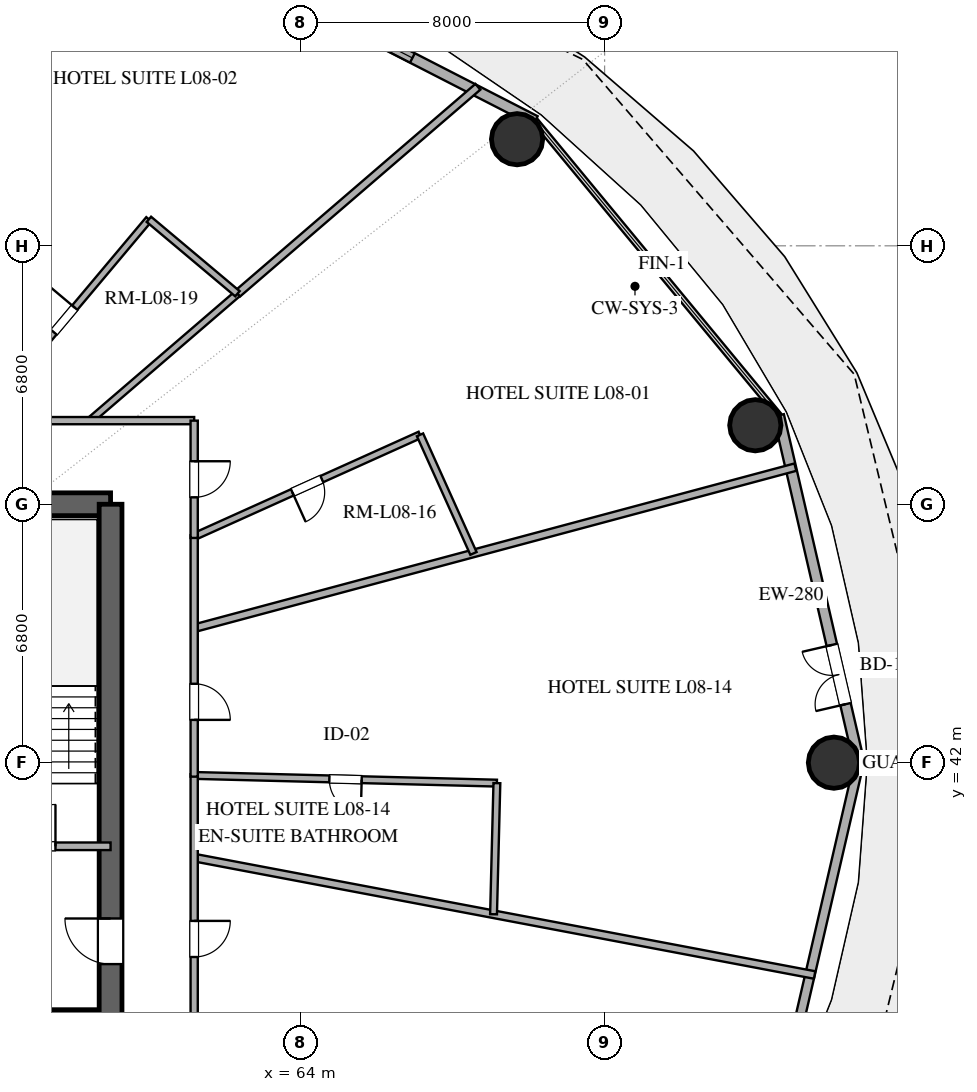
"""IFC4 building model, lengths in metres.
Left out: names, types, materials, properties, quantities, classifications, styles, units other than length and angle.
Written with IfcOpenShell. Run it as: python <this file> out.ifc"""

import sys

from ifc_helpers import new_model, si_unit, direction, frame, frame_2d, origin, origin_2d, place, context, subcontext, project, spatial, rectangle, hollow_circle, extrude, element, fill, save


model = new_model("IFC4")
c1 = context("Model", 3, precision=1e-05, world=origin(), true_north=direction((0.0, 1.0)))
c2 = subcontext(c1, "Body", "Model", "MODEL_VIEW")
j1 = project(units=[si_unit("LENGTHUNIT", "METRE"), si_unit("PLANEANGLEUNIT", "RADIAN")], contexts=[c1])
p1 = place(None, origin())
s1 = spatial("IfcSite", under=j1, at=p1, CompositionType="ELEMENT")
p2 = place(p1, origin())
s2 = spatial("IfcBuilding", under=s1, at=p2, CompositionType="ELEMENT")
p3 = place(p2, frame((0.0, 0.0, 39.0)))
s3 = spatial("IfcBuildingStorey", under=s2, at=p3, CompositionType="ELEMENT", Elevation=39.0)
for number, where, z_axis, x_axis in (
    (1, (55.0, 35.2, 0.0), (0.0, 0.0, 1.0), (1.0, 0.0, 0.0)),
    (2, (55.0, 48.8, 0.0), (0.0, 0.0, 1.0), (1.0, 0.0, 0.0)),
):
    element("IfcWall", number, at=place(p3, frame(where, z_axis=z_axis, x_axis=x_axis)), inside=s3, PredefinedType="SHEAR", context=c2, shape_type="SweptSolid", body=[
        extrude(rectangle(XDim=4.0, YDim=0.6, at=frame_2d((2.0, 0.0))), origin(), (0.0, 0.0, 1.0), 3.38),
    ])
p4 = place(p3, frame((59.0, 35.2, 0.0), z_axis=(0.0, 0.0, 1.0), x_axis=(0.0, 1.0, 0.0)))
e3 = element("IfcWall", 3, at=p4, inside=s3, PredefinedType="SHEAR", context=c2, shape_type="SweptSolid", body=[
    extrude(rectangle(XDim=13.6, YDim=0.6, at=frame_2d((6.8, 0.0))), origin(), (0.0, 0.0, 1.0), 3.38),
])
p5 = place(p4, frame((1.5, 0.0, 0.0)))
e4 = element("IfcOpeningElement", 4, at=p5, cuts=e3, PredefinedType="OPENING", context=c2, shape_type="SweptSolid", body=[
    extrude(rectangle(XDim=1.2, YDim=2.15, at=frame_2d((0.6, 1.075))), frame((0.0, 0.31, 0.0), z_axis=(0.0, -1.0, 0.0), x_axis=(1.0, 0.0, 0.0)), (0.0, 0.0, 1.0), 0.62),
])
for number, where, z_axis, x_axis in (
    (5, (78.035, 42.0, 0.0), (0.0, 0.0, 1.0), (1.0, 0.0, 0.0)),
    (6, (75.966, 50.878, 0.0), (0.0, 0.0, 1.0), (1.0, 0.0, 0.0)),
    (7, (69.697, 58.405, 0.0), (0.0, 0.0, 1.0), (1.0, 0.0, 0.0)),
):
    element("IfcColumn", number, at=place(p3, frame(where, z_axis=z_axis, x_axis=x_axis)), inside=s3, PredefinedType="COLUMN", context=c2, shape_type="SweptSolid", body=[
        extrude(hollow_circle(Radius=0.675, WallThickness=0.036, at=origin_2d()), origin(), (0.0, 0.0, 1.0), 3.38),
    ])
p6 = place(p3, frame((78.696, 42.0, 0.0), z_axis=(0.0, 0.0, 1.0), x_axis=(-0.225454452941, 0.974253709076, 0.0)))
e8 = element("IfcWall", 8, at=p6, inside=s3, PredefinedType="SOLIDWALL", context=c2, shape_type="SweptSolid", body=[
    extrude(rectangle(XDim=9.38, YDim=0.28, at=frame_2d((4.69, 0.0))), origin(), (0.0, 0.0, 1.0), 3.38),
])
p7 = place(p6, frame((1.579, 0.0, 0.0)))
e9 = element("IfcOpeningElement", 9, at=p7, cuts=e8, PredefinedType="OPENING", context=c2, shape_type="SweptSolid", body=[
    extrude(rectangle(XDim=1.6, YDim=2.25, at=frame_2d((0.8, 1.125))), frame((0.0, 0.15, 0.0), z_axis=(0.0, -1.0, 0.0), x_axis=(1.0, 0.0, 0.0)), (0.0, 0.0, 1.0), 0.3),
])
p8 = place(p3, frame((70.174, 58.886, 0.0), z_axis=(0.0, 0.0, 1.0), x_axis=(-0.889853976658, 0.456245438581, 0.0)))
e10 = element("IfcWall", 10, at=p8, inside=s3, PredefinedType="SOLIDWALL", context=c2, shape_type="SweptSolid", body=[
    extrude(rectangle(XDim=11.346, YDim=0.28, at=frame_2d((5.673, 0.0))), origin(), (0.0, 0.0, 1.0), 3.38),
])
p9 = place(p8, frame((3.632, 0.0, 0.85)))
e11 = element("IfcOpeningElement", 11, at=p9, cuts=e10, PredefinedType="OPENING", context=c2, shape_type="SweptSolid", body=[
    extrude(rectangle(XDim=1.5, YDim=2.0, at=frame_2d((0.75, 1.0))), frame((0.0, 0.15, 0.0), z_axis=(0.0, -1.0, 0.0), x_axis=(1.0, 0.0, 0.0)), (0.0, 0.0, 1.0), 0.3),
])
p10 = place(p8, frame((6.761, 0.0, 0.85)))
e12 = element("IfcOpeningElement", 12, at=p10, cuts=e10, PredefinedType="OPENING", context=c2, shape_type="SweptSolid", body=[
    extrude(rectangle(XDim=1.5, YDim=2.0, at=frame_2d((0.75, 1.0))), frame((0.0, 0.15, 0.0), z_axis=(0.0, -1.0, 0.0), x_axis=(1.0, 0.0, 0.0)), (0.0, 0.0, 1.0), 0.3),
])
p11 = place(p3, frame((76.581, 32.862, 0.0), z_axis=(0.0, 0.0, 1.0), x_axis=(0.225454452941, 0.974253709076, 0.0)))
e13 = element("IfcWall", 13, at=p11, inside=s3, PredefinedType="SOLIDWALL", context=c2, shape_type="SweptSolid", body=[
    extrude(rectangle(XDim=9.38, YDim=0.25, at=frame_2d((4.69, 0.0))), origin(), (0.0, 0.0, 1.0), 3.38),
])
p12 = place(p3, frame((55.0, 39.8, 0.0), z_axis=(0.0, 0.0, 1.0), x_axis=(1.0, 0.0, 0.0)))
e14 = element("IfcWall", 14, at=p12, inside=s3, PredefinedType="SOLIDWALL", context=c2, shape_type="SweptSolid", body=[
    extrude(rectangle(XDim=4.0, YDim=0.2, at=frame_2d((2.0, 0.0))), origin(), (0.0, 0.0, 1.0), 2.74),
])
p13 = place(p12, frame((1.45, 0.0, 0.0)))
e15 = element("IfcOpeningElement", 15, at=p13, cuts=e14, PredefinedType="OPENING", context=c2, shape_type="SweptSolid", body=[
    extrude(rectangle(XDim=1.1, YDim=2.15, at=frame_2d((0.55, 1.075))), frame((0.0, 0.11, 0.0), z_axis=(0.0, -1.0, 0.0), x_axis=(1.0, 0.0, 0.0)), (0.0, 0.0, 1.0), 0.22),
])
p14 = place(p3, frame((57.825, 64.519, 0.0), z_axis=(0.0, 0.0, 1.0), x_axis=(-0.399884283786, -0.916565632991, 0.0)))
e16 = element("IfcWall", 16, at=p14, inside=s3, PredefinedType="PARTITIONING", context=c2, shape_type="SweptSolid", body=[
    extrude(rectangle(XDim=14.749, YDim=0.2, at=frame_2d((7.375, 0.0))), origin(), (0.0, 0.0, 1.0), 2.74),
])
p15 = place(p3, frame((61.2, 45.537, 0.0), z_axis=(0.0, 0.0, 1.0), x_axis=(0.965922233104, 0.258832454679, 0.0)))
e17 = element("IfcWall", 17, at=p15, inside=s3, PredefinedType="PARTITIONING", context=c2, shape_type="SweptSolid", body=[
    extrude(rectangle(XDim=16.377, YDim=0.2, at=frame_2d((8.189, 0.0))), origin(), (0.0, 0.0, 1.0), 2.74),
])
p16 = place(p3, frame((61.2, 39.502, 0.0), z_axis=(0.0, 0.0, 1.0), x_axis=(0.982565603173, -0.185916205484, 0.0)))
e18 = element("IfcWall", 18, at=p16, inside=s3, PredefinedType="PARTITIONING", context=c2, shape_type="SweptSolid", body=[
    extrude(rectangle(XDim=16.616, YDim=0.2, at=frame_2d((8.308, 0.0))), origin(), (0.0, 0.0, 1.0), 2.74),
])
p17 = place(p3, frame((68.666, 59.784, 0.0), z_axis=(0.0, 0.0, 1.0), x_axis=(-0.757966817992, -0.652293111127, 0.0)))
e19 = element("IfcWall", 19, at=p17, inside=s3, PredefinedType="PARTITIONING", context=c2, shape_type="SweptSolid", body=[
    extrude(rectangle(XDim=8.347, YDim=0.2, at=frame_2d((4.174, 0.0))), origin(), (0.0, 0.0, 1.0), 2.74),
])
p18 = place(p3, frame((69.165, 41.462, 0.0), z_axis=(0.0, 0.0, 1.0), x_axis=(-0.999676564425, 0.025431605115, 0.0)))
e20 = element("IfcWall", 20, at=p18, inside=s3, PredefinedType="PLUMBINGWALL", context=c2, shape_type="SweptSolid", body=[
    extrude(rectangle(XDim=7.968, YDim=0.18, at=frame_2d((3.984, 0.0))), origin(), (0.0, 0.0, 1.0), 2.74),
])
p19 = place(p18, frame((3.559, 0.0, 0.0)))
e21 = element("IfcOpeningElement", 21, at=p19, cuts=e20, PredefinedType="OPENING", context=c2, shape_type="SweptSolid", body=[
    extrude(rectangle(XDim=0.85, YDim=2.1, at=frame_2d((0.425, 1.05))), frame((0.0, 0.1, 0.0), z_axis=(0.0, -1.0, 0.0), x_axis=(1.0, 0.0, 0.0)), (0.0, 0.0, 1.0), 0.2),
])
p20 = place(p3, frame((55.56, 51.0, 0.0), z_axis=(0.0, 0.0, 1.0), x_axis=(0.643154836645, 0.765736153058, 0.0)))
e22 = element("IfcWall", 22, at=p20, inside=s3, PredefinedType="PLUMBINGWALL", context=c2, shape_type="SweptSolid", body=[
    extrude(rectangle(XDim=6.917, YDim=0.18, at=frame_2d((3.458, 0.0))), origin(), (0.0, 0.0, 1.0), 2.74),
])
p21 = place(p20, frame((3.034, 0.0, 0.0)))
e23 = element("IfcOpeningElement", 23, at=p21, cuts=e22, PredefinedType="OPENING", context=c2, shape_type="SweptSolid", body=[
    extrude(rectangle(XDim=0.85, YDim=2.1, at=frame_2d((0.425, 1.05))), frame((0.0, 0.1, 0.0), z_axis=(0.0, -1.0, 0.0), x_axis=(1.0, 0.0, 0.0)), (0.0, 0.0, 1.0), 0.2),
])
p22 = place(p3, frame((67.143, 50.626, 0.0), z_axis=(0.0, 0.0, 1.0), x_axis=(-0.911702033518, -0.410852044025, 0.0)))
e24 = element("IfcWall", 24, at=p22, inside=s3, PredefinedType="PLUMBINGWALL", context=c2, shape_type="SweptSolid", body=[
    extrude(rectangle(XDim=6.519, YDim=0.18, at=frame_2d((3.259, 0.0))), origin(), (0.0, 0.0, 1.0), 2.74),
])
p23 = place(p22, frame((2.834, 0.0, 0.0)))
e25 = element("IfcOpeningElement", 25, at=p23, cuts=e24, PredefinedType="OPENING", context=c2, shape_type="SweptSolid", body=[
    extrude(rectangle(XDim=0.85, YDim=2.1, at=frame_2d((0.425, 1.05))), frame((0.0, 0.1, 0.0), z_axis=(0.0, -1.0, 0.0), x_axis=(1.0, 0.0, 0.0)), (0.0, 0.0, 1.0), 0.2),
])
p24 = place(p3, frame((62.339, 54.339, 0.0), z_axis=(0.0, 0.0, 1.0), x_axis=(-0.757969199921, -0.652290343307, 0.0)))
e26 = element("IfcWall", 26, at=p24, inside=s3, PredefinedType="PLUMBINGWALL", context=c2, shape_type="SweptSolid", body=[
    extrude(rectangle(XDim=5.119, YDim=0.18, at=frame_2d((2.56, 0.0))), origin(), (0.0, 0.0, 1.0), 2.74),
])
p25 = place(p3, frame((61.2, 41.696, 0.0), z_axis=(0.0, 0.0, 1.0), x_axis=(0.0, -1.0, 0.0)))
e27 = element("IfcWall", 27, at=p25, inside=s3, PredefinedType="PARTITIONING", context=c2, shape_type="SweptSolid", body=[
    extrude(rectangle(XDim=8.696, YDim=0.19, at=frame_2d((4.348, 0.0))), origin(), (0.0, 0.0, 1.0), 2.74),
])
p26 = place(p25, frame((3.86, 0.0, 0.0)))
e28 = element("IfcOpeningElement", 28, at=p26, cuts=e27, PredefinedType="OPENING", context=c2, shape_type="SweptSolid", body=[
    extrude(rectangle(XDim=0.95, YDim=2.15, at=frame_2d((0.475, 1.075))), frame((0.0, 0.105, 0.0), z_axis=(0.0, -1.0, 0.0), x_axis=(1.0, 0.0, 0.0)), (0.0, 0.0, 1.0), 0.21),
])
p27 = place(p3, frame((46.153, 51.0, 0.0), z_axis=(0.0, 0.0, 1.0), x_axis=(1.0, 0.0, 0.0)))
e29 = element("IfcWall", 29, at=p27, inside=s3, PredefinedType="PARTITIONING", context=c2, shape_type="SweptSolid", body=[
    extrude(rectangle(XDim=15.047, YDim=0.19, at=frame_2d((7.524, 0.0))), origin(), (0.0, 0.0, 1.0), 2.74),
])
p28 = place(p27, frame((3.144, 0.0, 0.0)))
e30 = element("IfcOpeningElement", 30, at=p28, cuts=e29, PredefinedType="OPENING", context=c2, shape_type="SweptSolid", body=[
    extrude(rectangle(XDim=1.0, YDim=2.2, at=frame_2d((0.5, 1.1))), frame((0.0, 0.105, 0.0), z_axis=(0.0, -1.0, 0.0), x_axis=(1.0, 0.0, 0.0)), (0.0, 0.0, 1.0), 0.21),
])
p29 = place(p27, frame((7.119, 0.0, 0.0)))
e31 = element("IfcOpeningElement", 31, at=p29, cuts=e29, PredefinedType="OPENING", context=c2, shape_type="SweptSolid", body=[
    extrude(rectangle(XDim=0.95, YDim=2.15, at=frame_2d((0.475, 1.075))), frame((0.0, 0.105, 0.0), z_axis=(0.0, -1.0, 0.0), x_axis=(1.0, 0.0, 0.0)), (0.0, 0.0, 1.0), 0.21),
])
p30 = place(p3, frame((61.2, 47.983, 0.0), z_axis=(0.0, 0.0, 1.0), x_axis=(0.0, -1.0, 0.0)))
e32 = element("IfcWall", 32, at=p30, inside=s3, PredefinedType="PARTITIONING", context=c2, shape_type="SweptSolid", body=[
    extrude(rectangle(XDim=6.351, YDim=0.19, at=frame_2d((3.176, 0.0))), origin(), (0.0, 0.0, 1.0), 2.74),
])
p31 = place(p30, frame((3.907, 0.0, 0.0)))
e33 = element("IfcOpeningElement", 33, at=p31, cuts=e32, PredefinedType="OPENING", context=c2, shape_type="SweptSolid", body=[
    extrude(rectangle(XDim=0.95, YDim=2.15, at=frame_2d((0.475, 1.075))), frame((0.0, 0.105, 0.0), z_axis=(0.0, -1.0, 0.0), x_axis=(1.0, 0.0, 0.0)), (0.0, 0.0, 1.0), 0.21),
])
p32 = place(p3, frame((69.078, 38.012, 0.0), z_axis=(0.0, 0.0, 1.0), x_axis=(0.02539873932, 0.999677399985, 0.0)))
e34 = element("IfcWall", 34, at=p32, inside=s3, PredefinedType="PLUMBINGWALL", context=c2, shape_type="SweptSolid", body=[
    extrude(rectangle(XDim=3.451, YDim=0.18, at=frame_2d((1.726, 0.0))), origin(), (0.0, 0.0, 1.0), 2.74),
])
p33 = place(p3, frame((68.549, 47.506, 0.0), z_axis=(0.0, 0.0, 1.0), x_axis=(-0.410839223928, 0.911707810695, 0.0)))
e35 = element("IfcWall", 35, at=p33, inside=s3, PredefinedType="PLUMBINGWALL", context=c2, shape_type="SweptSolid", body=[
    extrude(rectangle(XDim=3.422, YDim=0.18, at=frame_2d((1.711, 0.0))), origin(), (0.0, 0.0, 1.0), 2.74),
])
p34 = place(p3, frame((61.2, 51.0, 0.0), z_axis=(0.0, 0.0, 1.0), x_axis=(0.0, -1.0, 0.0)))
e36 = element("IfcWall", 36, at=p34, inside=s3, PredefinedType="PARTITIONING", context=c2, shape_type="SweptSolid", body=[
    extrude(rectangle(XDim=3.087, YDim=0.19, at=frame_2d((1.543, 0.0))), origin(), (0.0, 0.0, 1.0), 2.74),
])
p35 = place(p34, frame((1.069, 0.0, 0.0)))
e37 = element("IfcOpeningElement", 37, at=p35, cuts=e36, PredefinedType="OPENING", context=c2, shape_type="SweptSolid", body=[
    extrude(rectangle(XDim=0.95, YDim=2.15, at=frame_2d((0.475, 1.075))), frame((0.0, 0.105, 0.0), z_axis=(0.0, -1.0, 0.0), x_axis=(1.0, 0.0, 0.0)), (0.0, 0.0, 1.0), 0.21),
])
p36 = place(p3, frame((60.008, 56.297, 0.0), z_axis=(0.0, 0.0, 1.0), x_axis=(0.765736471754, -0.643154457208, 0.0)))
e38 = element("IfcWall", 38, at=p36, inside=s3, PredefinedType="PLUMBINGWALL", context=c2, shape_type="SweptSolid", body=[
    extrude(rectangle(XDim=3.043, YDim=0.18, at=frame_2d((1.521, 0.0))), origin(), (0.0, 0.0, 1.0), 2.74),
])
p37 = place(p7, origin())
e39 = element("IfcDoor", 39, at=p37, inside=s3, OperationType="DOUBLE_DOOR_SINGLE_SWING", PredefinedType="DOOR", context=c2, shape_type="SweptSolid", body=[
    extrude(rectangle(XDim=1.6, YDim=2.25, at=frame_2d((0.8, 1.125))), frame((0.0, 0.025, 0.0), z_axis=(0.0, -1.0, 0.0), x_axis=(1.0, 0.0, 0.0)), (0.0, 0.0, 1.0), 0.05),
])
fill(e9, e39)
p38 = place(p9, origin())
e40 = element("IfcWindow", 40, at=p38, inside=s3, PartitioningType="SINGLE_PANEL", PredefinedType="WINDOW", context=c2, shape_type="SweptSolid", body=[
    extrude(rectangle(XDim=1.5, YDim=2.0, at=frame_2d((0.75, 1.0))), frame((0.0, 0.03, 0.0), z_axis=(0.0, -1.0, 0.0), x_axis=(1.0, 0.0, 0.0)), (0.0, 0.0, 1.0), 0.06),
])
fill(e11, e40)
p39 = place(p5, origin())
e41 = element("IfcDoor", 41, at=p39, inside=s3, OperationType="SINGLE_SWING_RIGHT", PredefinedType="DOOR", context=c2, shape_type="SweptSolid", body=[
    extrude(rectangle(XDim=1.2, YDim=2.15, at=frame_2d((0.6, 1.075))), frame((0.0, 0.025, 0.0), z_axis=(0.0, -1.0, 0.0), x_axis=(1.0, 0.0, 0.0)), (0.0, 0.0, 1.0), 0.05),
])
fill(e4, e41)
p40 = place(p13, origin())
e42 = element("IfcDoor", 42, at=p40, inside=s3, OperationType="SINGLE_SWING_RIGHT", PredefinedType="DOOR", context=c2, shape_type="SweptSolid", body=[
    extrude(rectangle(XDim=1.1, YDim=2.15, at=frame_2d((0.55, 1.075))), frame((0.0, 0.025, 0.0), z_axis=(0.0, -1.0, 0.0), x_axis=(1.0, 0.0, 0.0)), (0.0, 0.0, 1.0), 0.05),
])
fill(e15, e42)
p41 = place(p19, origin())
e43 = element("IfcDoor", 43, at=p41, inside=s3, OperationType="SINGLE_SWING_LEFT", PredefinedType="DOOR", context=c2, shape_type="SweptSolid", body=[
    extrude(rectangle(XDim=0.85, YDim=2.1, at=frame_2d((0.425, 1.05))), frame((0.0, 0.025, 0.0), z_axis=(0.0, -1.0, 0.0), x_axis=(1.0, 0.0, 0.0)), (0.0, 0.0, 1.0), 0.05),
])
fill(e21, e43)
p42 = place(p21, origin())
e44 = element("IfcDoor", 44, at=p42, inside=s3, OperationType="SINGLE_SWING_RIGHT", PredefinedType="DOOR", context=c2, shape_type="SweptSolid", body=[
    extrude(rectangle(XDim=0.85, YDim=2.1, at=frame_2d((0.425, 1.05))), frame((0.0, 0.025, 0.0), z_axis=(0.0, -1.0, 0.0), x_axis=(1.0, 0.0, 0.0)), (0.0, 0.0, 1.0), 0.05),
])
fill(e23, e44)
p43 = place(p23, origin())
e45 = element("IfcDoor", 45, at=p43, inside=s3, OperationType="SINGLE_SWING_RIGHT", PredefinedType="DOOR", context=c2, shape_type="SweptSolid", body=[
    extrude(rectangle(XDim=0.85, YDim=2.1, at=frame_2d((0.425, 1.05))), frame((0.0, 0.025, 0.0), z_axis=(0.0, -1.0, 0.0), x_axis=(1.0, 0.0, 0.0)), (0.0, 0.0, 1.0), 0.05),
])
fill(e25, e45)
p44 = place(p26, origin())
e46 = element("IfcDoor", 46, at=p44, inside=s3, OperationType="SINGLE_SWING_LEFT", PredefinedType="DOOR", context=c2, shape_type="SweptSolid", body=[
    extrude(rectangle(XDim=0.95, YDim=2.15, at=frame_2d((0.475, 1.075))), frame((0.0, 0.025, 0.0), z_axis=(0.0, -1.0, 0.0), x_axis=(1.0, 0.0, 0.0)), (0.0, 0.0, 1.0), 0.05),
])
fill(e28, e46)
p45 = place(p31, origin())
e47 = element("IfcDoor", 47, at=p45, inside=s3, OperationType="SINGLE_SWING_RIGHT", PredefinedType="DOOR", context=c2, shape_type="SweptSolid", body=[
    extrude(rectangle(XDim=0.95, YDim=2.15, at=frame_2d((0.475, 1.075))), frame((0.0, 0.025, 0.0), z_axis=(0.0, -1.0, 0.0), x_axis=(1.0, 0.0, 0.0)), (0.0, 0.0, 1.0), 0.05),
])
fill(e33, e47)
p46 = place(p35, origin())
e48 = element("IfcDoor", 48, at=p46, inside=s3, OperationType="SINGLE_SWING_LEFT", PredefinedType="DOOR", context=c2, shape_type="SweptSolid", body=[
    extrude(rectangle(XDim=0.95, YDim=2.15, at=frame_2d((0.475, 1.075))), frame((0.0, 0.025, 0.0), z_axis=(0.0, -1.0, 0.0), x_axis=(1.0, 0.0, 0.0)), (0.0, 0.0, 1.0), 0.05),
])
fill(e37, e48)
save(model, sys.argv[1])
